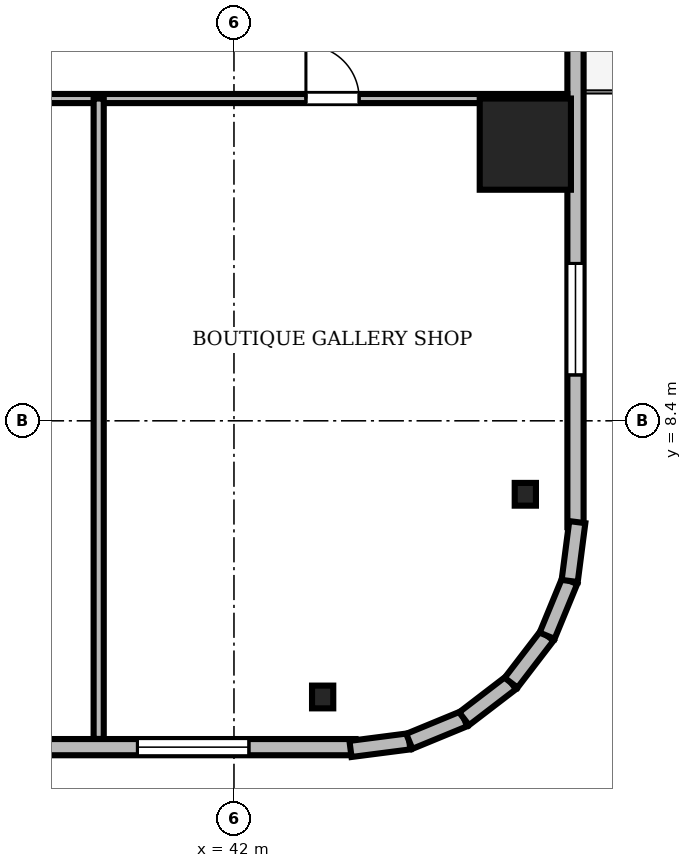
"""IFC4 building model, lengths in metres.
Left out: names, types, materials, properties, quantities, classifications, styles, units other than length and angle.
Written with IfcOpenShell. Run it as: python <this file> out.ifc"""

import sys

from ifc_helpers import new_model, si_unit, direction, frame, frame_2d, origin, origin_2d, place, context, subcontext, project, spatial, rectangle, i_section, extrude, source, transform, mapped, element, fill, save


model = new_model("IFC4")
c1 = context("Model", 3, precision=1e-05, world=origin(), true_north=direction((0.0, 1.0)))
c2 = subcontext(c1, "Body", "Model", "MODEL_VIEW")
j1 = project(units=[si_unit("LENGTHUNIT", "METRE"), si_unit("PLANEANGLEUNIT", "RADIAN")], contexts=[c1])
p1 = place(None, origin())
s1 = spatial("IfcSite", under=j1, at=p1, CompositionType="ELEMENT")
p2 = place(p1, origin())
s2 = spatial("IfcBuilding", under=s1, at=p2, CompositionType="ELEMENT")
p3 = place(p2, frame((0.0, 0.0, 75.05)))
s3 = spatial("IfcBuildingStorey", under=s2, at=p3, CompositionType="ELEMENT", Elevation=75.05)
m1 = source(origin(), c2, "Body", "SweptSolid", [
    extrude(rectangle(XDim=1.8, YDim=1.8, at=origin_2d()), origin(), (0.0, 0.0, 1.0), 3.41),
])
p4 = place(p3, frame((47.75, 13.86, 0.0), z_axis=(0.0, 0.0, 1.0), x_axis=(1.0, 0.0, 0.0)))
e1 = element("IfcColumn", 1, at=p4, inside=s3, PredefinedType="COLUMN", context=c2, shape_type="MappedRepresentation", body=[
    mapped(m1, transform((0.0, 0.0, 0.0), scale=1.0)),
])
m2 = source(origin(), c2, "Body", "SweptSolid", [
    extrude(i_section(OverallWidth=0.419, OverallDepth=0.449, WebThickness=0.031, FlangeThickness=0.048, FilletRadius=0.015, at=origin_2d()), origin(), (0.0, 0.0, 1.0), 3.41),
])
for number, where, z_axis, x_axis in (
    (2, (43.75, 2.95, 0.0), (0.0, 0.0, 1.0), (1.0, 0.0, 0.0)),
    (3, (47.75, 6.95, 0.0), (0.0, 0.0, 1.0), (1.0, 0.0, 0.0)),
):
    element("IfcColumn", number, at=place(p3, frame(where, z_axis=z_axis, x_axis=x_axis)), inside=s3, PredefinedType="COLUMN", context=c2, shape_type="MappedRepresentation", body=[
        mapped(m2, transform((0.0, 0.0, 0.0), scale=1.0)),
    ])
m3 = source(origin(), c2, "Body", "SweptSolid", [
    extrude(rectangle(XDim=15.6, YDim=0.32, at=frame_2d((7.8, 0.0))), origin(), (0.0, 0.0, 1.0), 3.41),
])
p5 = place(p3, frame((28.8, 1.96, 0.0), z_axis=(0.0, 0.0, 1.0), x_axis=(1.0, 0.0, 0.0)))
e4 = element("IfcWall", 4, at=p5, inside=s3, PredefinedType="SOLIDWALL", context=c2, shape_type="MappedRepresentation", body=[
    mapped(m3, transform((0.0, 0.0, 0.0), scale=1.0)),
])
m4 = source(origin(), c2, "Body", "SweptSolid", [
    extrude(rectangle(XDim=1.4, YDim=2.3, at=frame_2d((0.7, 1.15))), frame((0.0, 0.17, 0.0), z_axis=(0.0, -1.0, 0.0), x_axis=(1.0, 0.0, 0.0)), (0.0, 0.0, 1.0), 0.34),
])
p6 = place(p5, frame((4.59, 0.0, 0.0)))
e5 = element("IfcOpeningElement", 5, at=p6, cuts=e4, PredefinedType="OPENING", context=c2, shape_type="MappedRepresentation", body=[
    mapped(m4, transform((0.0, 0.0, 0.0), scale=1.0)),
])
m5 = source(origin(), c2, "Body", "SweptSolid", [
    extrude(rectangle(XDim=2.2, YDim=2.4, at=frame_2d((1.1, 1.2))), frame((0.0, 0.17, 0.0), z_axis=(0.0, -1.0, 0.0), x_axis=(1.0, 0.0, 0.0)), (0.0, 0.0, 1.0), 0.34),
])
p7 = place(p5, frame((11.295, 0.0, 0.72)))
e6 = element("IfcOpeningElement", 6, at=p7, cuts=e4, PredefinedType="OPENING", context=c2, shape_type="MappedRepresentation", body=[
    mapped(m5, transform((0.0, 0.0, 0.0), scale=1.0)),
])
p8 = place(p3, frame((48.74, 6.3, 0.0), z_axis=(0.0, 0.0, 1.0), x_axis=(0.0, 1.0, 0.0)))
e7 = element("IfcWall", 7, at=p8, inside=s3, PredefinedType="SOLIDWALL", context=c2, shape_type="MappedRepresentation", body=[
    mapped(m3, transform((0.0, 0.0, 0.0), scale=1.0)),
])
p9 = place(p8, frame((9.61, 0.0, 0.0)))
e8 = element("IfcOpeningElement", 8, at=p9, cuts=e7, PredefinedType="OPENING", context=c2, shape_type="MappedRepresentation", body=[
    mapped(m4, transform((0.0, 0.0, 0.0), scale=1.0)),
])
p10 = place(p8, frame((3.005, 0.0, 0.72)))
e9 = element("IfcOpeningElement", 9, at=p10, cuts=e7, PredefinedType="OPENING", context=c2, shape_type="MappedRepresentation", body=[
    mapped(m5, transform((0.0, 0.0, 0.0), scale=1.0)),
])
m6 = source(origin(), c2, "Body", "SweptSolid", [
    extrude(rectangle(XDim=1.17, YDim=0.32, at=frame_2d((0.585, 0.0))), origin(), (0.0, 0.0, 1.0), 3.41),
])
p11 = place(p3, frame((44.3, 1.925, 0.0), z_axis=(0.0, 0.0, 1.0), x_axis=(0.991762485493, 0.128090485085, 0.0)))
e10 = element("IfcWall", 10, at=p11, inside=s3, PredefinedType="SOLIDWALL", context=c2, shape_type="MappedRepresentation", body=[
    mapped(m6, transform((0.0, 0.0, 0.0), scale=1.0)),
])
m7 = source(origin(), c2, "Body", "SweptSolid", [
    extrude(rectangle(XDim=1.169, YDim=0.32, at=frame_2d((0.585, 0.0))), origin(), (0.0, 0.0, 1.0), 3.41),
])
p12 = place(p3, frame((45.46, 2.074, 0.0), z_axis=(0.0, 0.0, 1.0), x_axis=(0.924479075121, 0.381232789334, 0.0)))
e11 = element("IfcWall", 11, at=p12, inside=s3, PredefinedType="SOLIDWALL", context=c2, shape_type="MappedRepresentation", body=[
    mapped(m7, transform((0.0, 0.0, 0.0), scale=1.0)),
])
m8 = source(origin(), c2, "Body", "SweptSolid", [
    extrude(rectangle(XDim=1.169, YDim=0.32, at=frame_2d((0.584, 0.0))), origin(), (0.0, 0.0, 1.0), 3.41),
])
p13 = place(p3, frame((46.541, 2.52, 0.0), z_axis=(0.0, 0.0, 1.0), x_axis=(0.793663520347, 0.608356981114, 0.0)))
e12 = element("IfcWall", 12, at=p13, inside=s3, PredefinedType="SOLIDWALL", context=c2, shape_type="MappedRepresentation", body=[
    mapped(m8, transform((0.0, 0.0, 0.0), scale=1.0)),
])
m9 = source(origin(), c2, "Body", "SweptSolid", [
    extrude(rectangle(XDim=1.169, YDim=0.32, at=frame_2d((0.584, 0.0))), origin(), (0.0, 0.0, 1.0), 3.41),
])
for number, where, z_axis, x_axis in (
    (13, (47.469, 3.231, 0.0), (0.0, 0.0, 1.0), (0.608, 0.794, 0.0)),
    (14, (48.18, 4.159, 0.0), (0.0, 0.0, 1.0), (0.381, 0.925, 0.0)),
):
    element("IfcWall", number, at=place(p3, frame(where, z_axis=z_axis, x_axis=x_axis)), inside=s3, PredefinedType="SOLIDWALL", context=c2, shape_type="MappedRepresentation", body=[
        mapped(m9, transform((0.0, 0.0, 0.0), scale=1.0)),
    ])
m10 = source(origin(), c2, "Body", "SweptSolid", [
    extrude(rectangle(XDim=1.171, YDim=0.32, at=frame_2d((0.585, 0.0))), origin(), (0.0, 0.0, 1.0), 3.41),
])
p14 = place(p3, frame((48.625, 5.24, 0.0), z_axis=(0.0, 0.0, 1.0), x_axis=(0.128269133229, 0.991739395941, 0.0)))
e15 = element("IfcWall", 15, at=p14, inside=s3, PredefinedType="SOLIDWALL", context=c2, shape_type="MappedRepresentation", body=[
    mapped(m10, transform((0.0, 0.0, 0.0), scale=1.0)),
])
m11 = source(origin(), c2, "Body", "SweptSolid", [
    extrude(rectangle(XDim=46.156, YDim=0.18, at=frame_2d((23.078, 0.0))), origin(), (0.0, 0.0, 1.0), 2.652),
])
p15 = place(p3, frame((2.422, 14.76, 0.0), z_axis=(0.0, 0.0, 1.0), x_axis=(1.0, 0.0, 0.0)))
e16 = element("IfcWall", 16, at=p15, inside=s3, PredefinedType="PARTITIONING", context=c2, shape_type="MappedRepresentation", body=[
    mapped(m11, transform((0.0, 0.0, 0.0), scale=1.0)),
])
m12 = source(origin(), c2, "Body", "SweptSolid", [
    extrude(rectangle(XDim=1.05, YDim=2.2, at=frame_2d((0.525, 1.1))), frame((0.0, 0.1, 0.0), z_axis=(0.0, -1.0, 0.0), x_axis=(1.0, 0.0, 0.0)), (0.0, 0.0, 1.0), 0.2),
])
p16 = place(p15, frame((15.148, 0.0, 0.0)))
e17 = element("IfcOpeningElement", 17, at=p16, cuts=e16, PredefinedType="OPENING", context=c2, shape_type="MappedRepresentation", body=[
    mapped(m12, transform((0.0, 0.0, 0.0), scale=1.0)),
])
p17 = place(p15, frame((19.38, 0.0, 0.0)))
e18 = element("IfcOpeningElement", 18, at=p17, cuts=e16, PredefinedType="OPENING", context=c2, shape_type="MappedRepresentation", body=[
    mapped(m12, transform((0.0, 0.0, 0.0), scale=1.0)),
])
p18 = place(p15, frame((26.183, 0.0, 0.0)))
e19 = element("IfcOpeningElement", 19, at=p18, cuts=e16, PredefinedType="OPENING", context=c2, shape_type="MappedRepresentation", body=[
    mapped(m12, transform((0.0, 0.0, 0.0), scale=1.0)),
])
p19 = place(p15, frame((32.986, 0.0, 0.0)))
e20 = element("IfcOpeningElement", 20, at=p19, cuts=e16, PredefinedType="OPENING", context=c2, shape_type="MappedRepresentation", body=[
    mapped(m12, transform((0.0, 0.0, 0.0), scale=1.0)),
])
p20 = place(p15, frame((40.998, 0.0, 0.0)))
e21 = element("IfcOpeningElement", 21, at=p20, cuts=e16, PredefinedType="OPENING", context=c2, shape_type="MappedRepresentation", body=[
    mapped(m12, transform((0.0, 0.0, 0.0), scale=1.0)),
])
m13 = source(origin(), c2, "Body", "SweptSolid", [
    extrude(rectangle(XDim=12.638, YDim=0.2, at=frame_2d((6.319, 0.0))), origin(), (0.0, 0.0, 1.0), 2.652),
])
p21 = place(p3, frame((39.33, 2.122, 0.0), z_axis=(0.0, 0.0, 1.0), x_axis=(0.0, 1.0, 0.0)))
e22 = element("IfcWall", 22, at=p21, inside=s3, PredefinedType="PARTITIONING", context=c2, shape_type="MappedRepresentation", body=[
    mapped(m13, transform((0.0, 0.0, 0.0), scale=1.0)),
])
m14 = source(origin(), c2, "Body", "SweptSolid", [
    extrude(rectangle(XDim=2.2, YDim=2.4, at=frame_2d((1.1, 1.2))), frame((0.0, 0.03, 0.0), z_axis=(0.0, -1.0, 0.0), x_axis=(1.0, 0.0, 0.0)), (0.0, 0.0, 1.0), 0.06),
])
p22 = place(p7, origin())
e23 = element("IfcWindow", 23, at=p22, inside=s3, PartitioningType="SINGLE_PANEL", PredefinedType="WINDOW", context=c2, shape_type="MappedRepresentation", body=[
    mapped(m14, transform((0.0, 0.0, 0.0), scale=1.0)),
])
fill(e6, e23)
p23 = place(p10, origin())
e24 = element("IfcWindow", 24, at=p23, inside=s3, PartitioningType="SINGLE_PANEL", PredefinedType="WINDOW", context=c2, shape_type="MappedRepresentation", body=[
    mapped(m14, transform((0.0, 0.0, 0.0), scale=1.0)),
])
fill(e9, e24)
m15 = source(origin(), c2, "Body", "SweptSolid", [
    extrude(rectangle(XDim=1.05, YDim=2.2, at=frame_2d((0.525, 1.1))), frame((0.0, 0.025, 0.0), z_axis=(0.0, -1.0, 0.0), x_axis=(1.0, 0.0, 0.0)), (0.0, 0.0, 1.0), 0.05),
])
p24 = place(p20, origin())
e25 = element("IfcDoor", 25, at=p24, inside=s3, OperationType="SINGLE_SWING_LEFT", PredefinedType="DOOR", context=c2, shape_type="MappedRepresentation", body=[
    mapped(m15, transform((0.0, 0.0, 0.0), scale=1.0)),
])
fill(e21, e25)
save(model, sys.argv[1])
